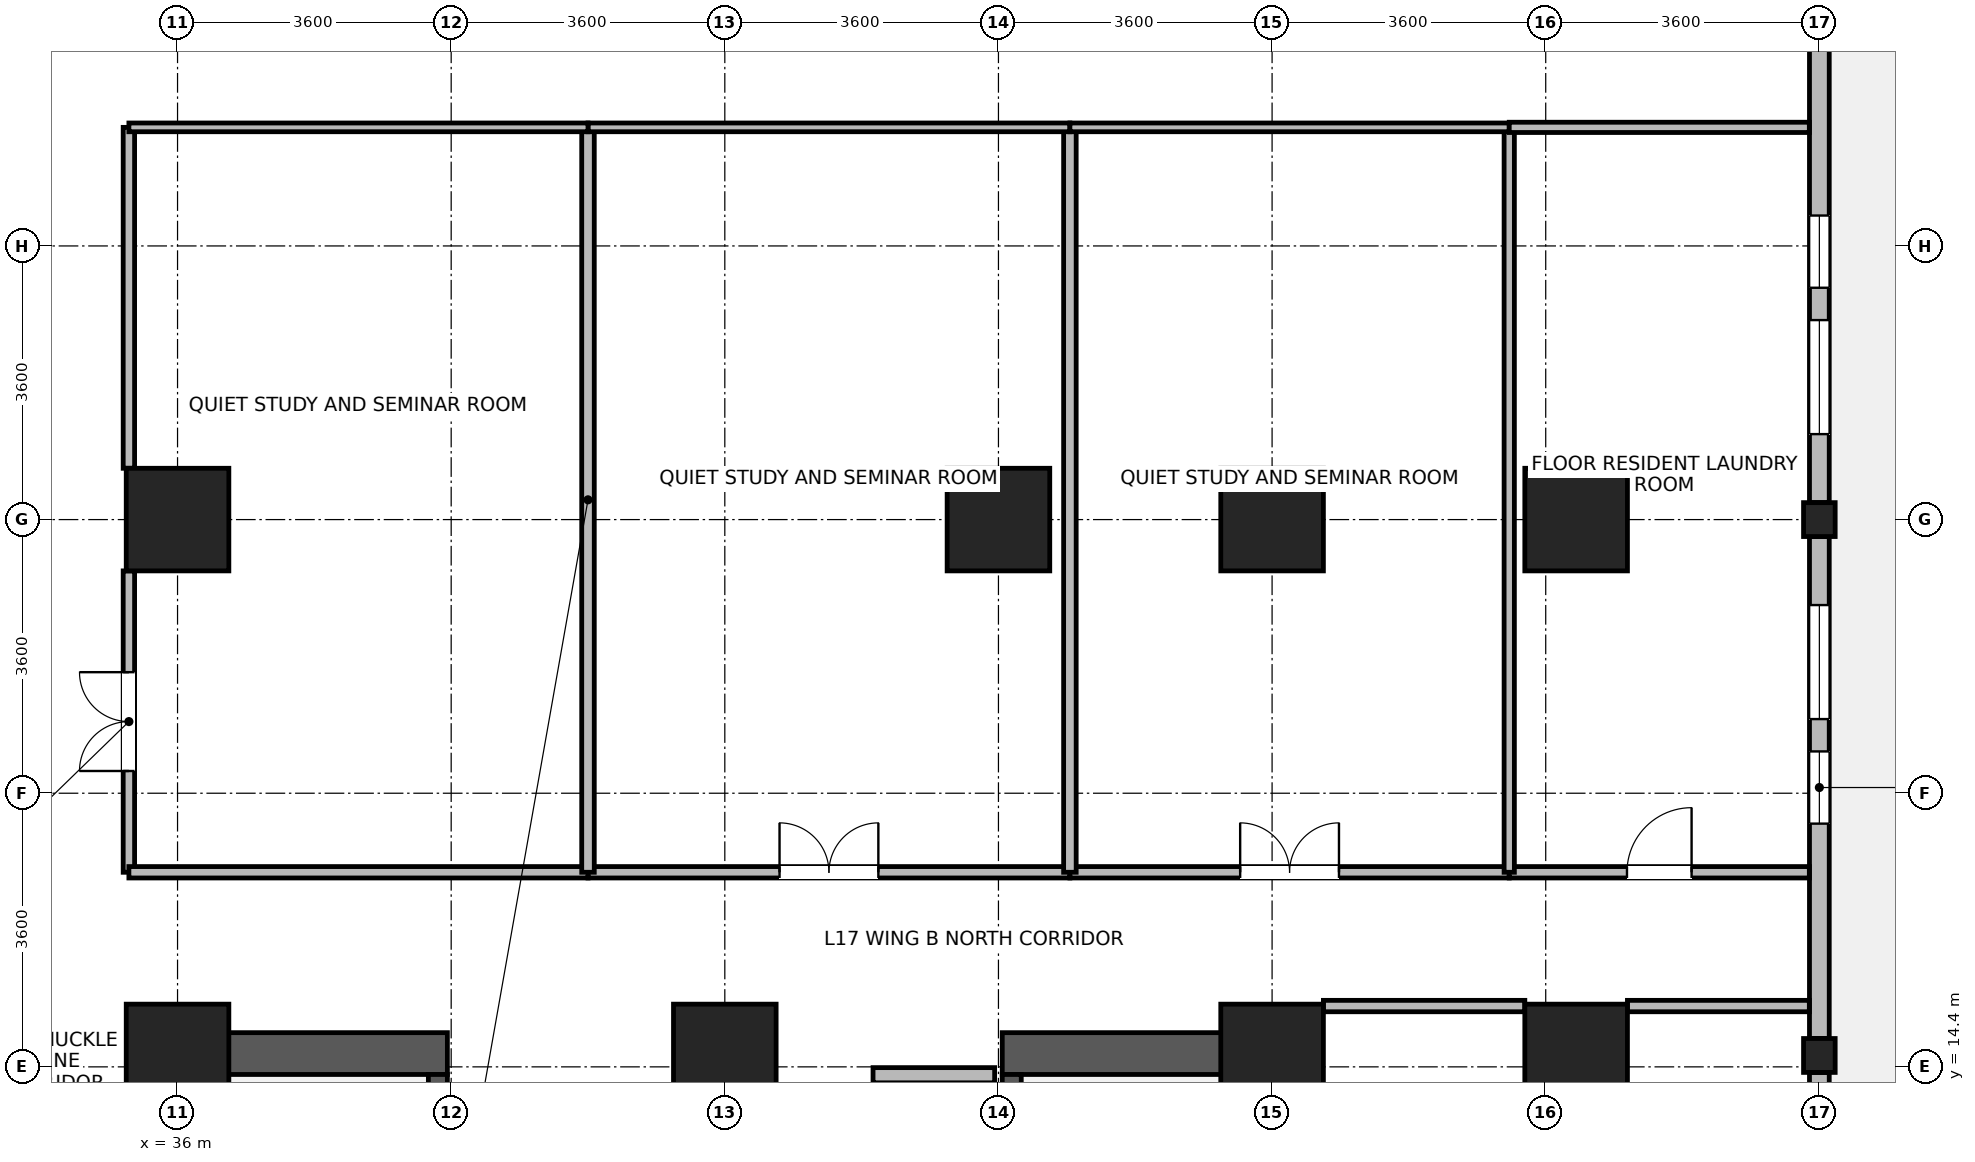
"""IFC4 building model, lengths in metres.
Left out: names, types, materials, properties, quantities, classifications, styles, units other than length and angle.
Written with IfcOpenShell. Run it as: python <this file> out.ifc"""

import sys

from ifc_helpers import new_model, si_unit, direction, frame, frame_2d, origin, origin_2d, place, context, subcontext, project, spatial, rectangle, i_section, extrude, source, transform, mapped, element, fill, save


model = new_model("IFC4")
c1 = context("Model", 3, precision=1e-05, world=origin(), true_north=direction((0.0, 1.0)))
c2 = subcontext(c1, "Body", "Model", "MODEL_VIEW")
j1 = project(units=[si_unit("LENGTHUNIT", "METRE"), si_unit("PLANEANGLEUNIT", "RADIAN")], contexts=[c1])
p1 = place(None, origin())
s1 = spatial("IfcSite", under=j1, at=p1, CompositionType="ELEMENT")
p2 = place(p1, origin())
s2 = spatial("IfcBuilding", under=s1, at=p2, CompositionType="ELEMENT")
p3 = place(p2, frame((0.0, 0.0, 69.7)))
s3 = spatial("IfcBuildingStorey", under=s2, at=p3, CompositionType="ELEMENT", Elevation=69.7)
for number, where, z_axis, x_axis in (
    (1, (36.075, 6.75, 0.0), (0.0, 0.0, 1.0), (0.0, 1.0, 0.0)),
    (2, (50.325, 6.75, 0.0), (0.0, 0.0, 1.0), (0.0, 1.0, 0.0)),
):
    element("IfcWall", number, at=place(p3, frame(where, z_axis=z_axis, x_axis=x_axis)), inside=s3, PredefinedType="SHEAR", context=c2, shape_type="SweptSolid", body=[
        extrude(rectangle(XDim=8.1, YDim=0.55, at=frame_2d((4.05, 0.0))), origin(), (0.0, 0.0, 1.0), 3.34),
    ])
for number, where, z_axis, x_axis in (
    (3, (36.35, 14.575, 0.0), (0.0, 0.0, 1.0), (1.0, 0.0, 0.0)),
    (4, (46.85, 14.575, 0.0), (0.0, 0.0, 1.0), (1.0, 0.0, 0.0)),
):
    element("IfcWall", number, at=place(p3, frame(where, z_axis=z_axis, x_axis=x_axis)), inside=s3, PredefinedType="SHEAR", context=c2, shape_type="SweptSolid", body=[
        extrude(rectangle(XDim=3.2, YDim=0.55, at=frame_2d((1.6, 0.0))), origin(), (0.0, 0.0, 1.0), 3.34),
    ])
p4 = place(p3, frame((39.425, 7.3, 0.0), z_axis=(0.0, 0.0, 1.0), x_axis=(0.0, 1.0, 0.0)))
e5 = element("IfcWall", 5, at=p4, inside=s3, PredefinedType="SHEAR", context=c2, shape_type="SweptSolid", body=[
    extrude(rectangle(XDim=7.0, YDim=0.25, at=frame_2d((3.5, 0.0))), origin(), (0.0, 0.0, 1.0), 3.34),
])
p5 = place(p4, frame((0.15, 0.0, 0.0)))
e6 = element("IfcOpeningElement", 6, at=p5, cuts=e5, PredefinedType="OPENING", context=c2, shape_type="SweptSolid", body=[
    extrude(rectangle(XDim=1.1, YDim=2.08, at=frame_2d((0.55, 1.04))), frame((0.0, 0.135, 0.0), z_axis=(0.0, -1.0, 0.0), x_axis=(1.0, 0.0, 0.0)), (0.0, 0.0, 1.0), 0.27),
])
p6 = place(p3, frame((46.975, 7.3, 0.0), z_axis=(0.0, 0.0, 1.0), x_axis=(0.0, 1.0, 0.0)))
e7 = element("IfcWall", 7, at=p6, inside=s3, PredefinedType="SHEAR", context=c2, shape_type="SweptSolid", body=[
    extrude(rectangle(XDim=7.0, YDim=0.25, at=frame_2d((3.5, 0.0))), origin(), (0.0, 0.0, 1.0), 3.34),
])
p7 = place(p6, frame((0.15, 0.0, 0.0)))
e8 = element("IfcOpeningElement", 8, at=p7, cuts=e7, PredefinedType="OPENING", context=c2, shape_type="SweptSolid", body=[
    extrude(rectangle(XDim=1.1, YDim=2.08, at=frame_2d((0.55, 1.04))), frame((0.0, 0.135, 0.0), z_axis=(0.0, -1.0, 0.0), x_axis=(1.0, 0.0, 0.0)), (0.0, 0.0, 1.0), 0.27),
])
m1 = source(origin(), c2, "Body", "SweptSolid", [
    extrude(rectangle(XDim=1.35, YDim=1.35, at=origin_2d()), origin(), (0.0, 0.0, 1.0), 3.7),
])
for number, where, z_axis, x_axis in (
    (9, (36.0, 21.6, 0.0), (0.0, 0.0, 1.0), (1.0, 0.0, 0.0)),
    (10, (46.8, 21.6, 0.0), (0.0, 0.0, 1.0), (1.0, 0.0, 0.0)),
    (11, (36.0, 14.55, 0.0), (0.0, 0.0, 1.0), (1.0, 0.0, 0.0)),
    (12, (43.2, 14.55, 0.0), (0.0, 0.0, 1.0), (1.0, 0.0, 0.0)),
    (13, (50.4, 14.55, 0.0), (0.0, 0.0, 1.0), (1.0, 0.0, 0.0)),
    (14, (50.4, 21.6, 0.0), (0.0, 0.0, 1.0), (1.0, 0.0, 0.0)),
    (15, (54.4, 14.55, 0.0), (0.0, 0.0, 1.0), (1.0, 0.0, 0.0)),
    (16, (54.4, 21.6, 0.0), (0.0, 0.0, 1.0), (1.0, 0.0, 0.0)),
):
    element("IfcColumn", number, at=place(p3, frame(where, z_axis=z_axis, x_axis=x_axis)), inside=s3, PredefinedType="COLUMN", context=c2, shape_type="MappedRepresentation", body=[
        mapped(m1, transform((0.0, 0.0, 0.0), x_axis=(1.0, 0.0, 0.0), y_axis=(0.0, 1.0, 0.0), z_axis=(0.0, 0.0, 1.0), scale=1.0)),
    ])
m2 = source(origin(), c2, "Body", "SweptSolid", [
    extrude(i_section(OverallWidth=0.416, OverallDepth=0.446, WebThickness=0.029, FlangeThickness=0.04, FilletRadius=0.015, at=origin_2d()), origin(), (0.0, 0.0, 1.0), 3.7),
])
for number, where, z_axis, x_axis in (
    (17, (57.6, 14.55, 0.0), (0.0, 0.0, 1.0), (1.0, 0.0, 0.0)),
    (18, (57.6, 21.6, 0.0), (0.0, 0.0, 1.0), (1.0, 0.0, 0.0)),
):
    element("IfcColumn", number, at=place(p3, frame(where, z_axis=z_axis, x_axis=x_axis)), inside=s3, PredefinedType="COLUMN", context=c2, shape_type="MappedRepresentation", body=[
        mapped(m2, transform((0.0, 0.0, 0.0), x_axis=(1.0, 0.0, 0.0), y_axis=(0.0, 1.0, 0.0), z_axis=(0.0, 0.0, 1.0), scale=1.0)),
    ])
p8 = place(p3, frame((57.6, 14.326, 0.0), z_axis=(0.0, 0.0, 1.0), x_axis=(0.0, -1.0, 0.0)))
e19 = element("IfcWall", 19, at=p8, inside=s3, PredefinedType="STANDARD", context=c2, shape_type="SweptSolid", body=[
    extrude(rectangle(XDim=7.052, YDim=0.26, at=frame_2d((3.526, 0.0))), origin(), (0.0, 0.0, 1.0), 2.82),
])
p9 = place(p8, frame((2.776, 0.0, 0.0)))
e20 = element("IfcOpeningElement", 20, at=p9, cuts=e19, PredefinedType="OPENING", context=c2, shape_type="SweptSolid", body=[
    extrude(rectangle(XDim=1.5, YDim=2.15, at=frame_2d((0.75, 1.075))), frame((0.0, 0.14, 0.0), z_axis=(0.0, -1.0, 0.0), x_axis=(1.0, 0.0, 0.0)), (0.0, 0.0, 1.0), 0.28),
])
p10 = place(p8, frame((1.013, 0.0, 0.85)))
e21 = element("IfcOpeningElement", 21, at=p10, cuts=e19, PredefinedType="OPENING", context=c2, shape_type="SweptSolid", body=[
    extrude(rectangle(XDim=1.5, YDim=1.85, at=frame_2d((0.75, 0.925))), frame((0.0, 0.14, 0.0), z_axis=(0.0, -1.0, 0.0), x_axis=(1.0, 0.0, 0.0)), (0.0, 0.0, 1.0), 0.28),
])
p11 = place(p8, frame((4.539, 0.0, 0.85)))
e22 = element("IfcOpeningElement", 22, at=p11, cuts=e19, PredefinedType="OPENING", context=c2, shape_type="SweptSolid", body=[
    extrude(rectangle(XDim=1.5, YDim=1.85, at=frame_2d((0.75, 0.925))), frame((0.0, 0.14, 0.0), z_axis=(0.0, -1.0, 0.0), x_axis=(1.0, 0.0, 0.0)), (0.0, 0.0, 1.0), 0.28),
])
p12 = place(p3, frame((57.6, 21.376, 0.0), z_axis=(0.0, 0.0, 1.0), x_axis=(0.0, -1.0, 0.0)))
e23 = element("IfcWall", 23, at=p12, inside=s3, PredefinedType="STANDARD", context=c2, shape_type="SweptSolid", body=[
    extrude(rectangle(XDim=6.602, YDim=0.26, at=frame_2d((3.301, 0.0))), origin(), (0.0, 0.0, 1.0), 2.82),
])
p13 = place(p12, frame((0.9, 0.0, 0.85)))
e24 = element("IfcOpeningElement", 24, at=p13, cuts=e23, PredefinedType="OPENING", context=c2, shape_type="SweptSolid", body=[
    extrude(rectangle(XDim=1.5, YDim=1.85, at=frame_2d((0.75, 0.925))), frame((0.0, 0.14, 0.0), z_axis=(0.0, -1.0, 0.0), x_axis=(1.0, 0.0, 0.0)), (0.0, 0.0, 1.0), 0.28),
])
p14 = place(p12, frame((2.826, 0.0, 0.85)))
e25 = element("IfcOpeningElement", 25, at=p14, cuts=e23, PredefinedType="OPENING", context=c2, shape_type="SweptSolid", body=[
    extrude(rectangle(XDim=0.95, YDim=1.75, at=frame_2d((0.475, 0.875))), frame((0.0, 0.14, 0.0), z_axis=(0.0, -1.0, 0.0), x_axis=(1.0, 0.0, 0.0)), (0.0, 0.0, 1.0), 0.28),
])
p15 = place(p3, frame((57.6, 28.426, 0.0), z_axis=(0.0, 0.0, 1.0), x_axis=(0.0, -1.0, 0.0)))
e26 = element("IfcWall", 26, at=p15, inside=s3, PredefinedType="STANDARD", context=c2, shape_type="SweptSolid", body=[
    extrude(rectangle(XDim=6.602, YDim=0.26, at=frame_2d((3.301, 0.0))), origin(), (0.0, 0.0, 1.0), 2.82),
])
p16 = place(p15, frame((4.201, 0.0, 0.85)))
e27 = element("IfcOpeningElement", 27, at=p16, cuts=e26, PredefinedType="OPENING", context=c2, shape_type="SweptSolid", body=[
    extrude(rectangle(XDim=1.5, YDim=1.85, at=frame_2d((0.75, 0.925))), frame((0.0, 0.14, 0.0), z_axis=(0.0, -1.0, 0.0), x_axis=(1.0, 0.0, 0.0)), (0.0, 0.0, 1.0), 0.28),
])
p17 = place(p15, frame((2.826, 0.0, 0.85)))
e28 = element("IfcOpeningElement", 28, at=p17, cuts=e26, PredefinedType="OPENING", context=c2, shape_type="SweptSolid", body=[
    extrude(rectangle(XDim=0.95, YDim=1.75, at=frame_2d((0.475, 0.875))), frame((0.0, 0.14, 0.0), z_axis=(0.0, -1.0, 0.0), x_axis=(1.0, 0.0, 0.0)), (0.0, 0.0, 1.0), 0.28),
])
p18 = place(p3, frame((45.15, 14.29, 0.0), z_axis=(0.0, 0.0, 1.0), x_axis=(1.0, 0.0, 0.0)))
e29 = element("IfcWall", 29, at=p18, inside=s3, PredefinedType="PARTITIONING", context=c2, shape_type="SweptSolid", body=[
    extrude(rectangle(XDim=1.6, YDim=0.2, at=frame_2d((0.8, 0.0))), origin(), (0.0, 0.0, 1.0), 2.12),
])
p19 = place(p3, frame((35.36, 16.96, 0.0), z_axis=(0.0, 0.0, 1.0), x_axis=(0.0, 1.0, 0.0)))
e30 = element("IfcWall", 30, at=p19, inside=s3, PredefinedType="PARTITIONING", context=c2, shape_type="SweptSolid", body=[
    extrude(rectangle(XDim=3.965, YDim=0.15, at=frame_2d((1.982, 0.0))), origin(), (0.0, 0.0, 1.0), 3.32),
])
p20 = place(p19, frame((1.333, 0.0, 0.0)))
e31 = element("IfcOpeningElement", 31, at=p20, cuts=e30, PredefinedType="OPENING", context=c2, shape_type="SweptSolid", body=[
    extrude(rectangle(XDim=1.3, YDim=2.12, at=frame_2d((0.65, 1.06))), frame((0.0, 0.085, 0.0), z_axis=(0.0, -1.0, 0.0), x_axis=(1.0, 0.0, 0.0)), (0.0, 0.0, 1.0), 0.17),
])
p21 = place(p3, frame((35.36, 22.275, 0.0), z_axis=(0.0, 0.0, 1.0), x_axis=(0.0, 1.0, 0.0)))
e32 = element("IfcWall", 32, at=p21, inside=s3, PredefinedType="PARTITIONING", context=c2, shape_type="SweptSolid", body=[
    extrude(rectangle(XDim=4.485, YDim=0.15, at=frame_2d((2.243, 0.0))), origin(), (0.0, 0.0, 1.0), 3.32),
])
p22 = place(p3, frame((51.075, 15.2, 0.0), z_axis=(0.0, 0.0, 1.0), x_axis=(1.0, 0.0, 0.0)))
e33 = element("IfcWall", 33, at=p22, inside=s3, PredefinedType="PARTITIONING", context=c2, shape_type="SweptSolid", body=[
    extrude(rectangle(XDim=2.65, YDim=0.15, at=frame_2d((1.325, 0.0))), origin(), (0.0, 0.0, 1.0), 3.32),
])
p23 = place(p3, frame((55.075, 15.2, 0.0), z_axis=(0.0, 0.0, 1.0), x_axis=(1.0, 0.0, 0.0)))
e34 = element("IfcWall", 34, at=p23, inside=s3, PredefinedType="PARTITIONING", context=c2, shape_type="SweptSolid", body=[
    extrude(rectangle(XDim=2.393, YDim=0.15, at=frame_2d((1.197, 0.0))), origin(), (0.0, 0.0, 1.0), 3.32),
])
p24 = place(p3, frame((41.4, 16.96, 0.0), z_axis=(0.0, 0.0, 1.0), x_axis=(1.0, 0.0, 0.0)))
e35 = element("IfcWall", 35, at=p24, inside=s3, PredefinedType="PARTITIONING", context=c2, shape_type="SweptSolid", body=[
    extrude(rectangle(XDim=6.34, YDim=0.15, at=frame_2d((3.17, 0.0))), origin(), (0.0, 0.0, 1.0), 3.32),
])
p25 = place(p24, frame((2.52, 0.0, 0.0)))
e36 = element("IfcOpeningElement", 36, at=p25, cuts=e35, PredefinedType="OPENING", context=c2, shape_type="SweptSolid", body=[
    extrude(rectangle(XDim=1.3, YDim=2.12, at=frame_2d((0.65, 1.06))), frame((0.0, 0.085, 0.0), z_axis=(0.0, -1.0, 0.0), x_axis=(1.0, 0.0, 0.0)), (0.0, 0.0, 1.0), 0.17),
])
p26 = place(p3, frame((35.36, 16.96, 0.0), z_axis=(0.0, 0.0, 1.0), x_axis=(1.0, 0.0, 0.0)))
e37 = element("IfcWall", 37, at=p26, inside=s3, PredefinedType="PARTITIONING", context=c2, shape_type="SweptSolid", body=[
    extrude(rectangle(XDim=6.04, YDim=0.15, at=frame_2d((3.02, 0.0))), origin(), (0.0, 0.0, 1.0), 3.32),
])
p27 = place(p3, frame((47.74, 16.96, 0.0), z_axis=(0.0, 0.0, 1.0), x_axis=(1.0, 0.0, 0.0)))
e38 = element("IfcWall", 38, at=p27, inside=s3, PredefinedType="PARTITIONING", context=c2, shape_type="SweptSolid", body=[
    extrude(rectangle(XDim=5.78, YDim=0.15, at=frame_2d((2.89, 0.0))), origin(), (0.0, 0.0, 1.0), 3.32),
])
p28 = place(p27, frame((2.24, 0.0, 0.0)))
e39 = element("IfcOpeningElement", 39, at=p28, cuts=e38, PredefinedType="OPENING", context=c2, shape_type="SweptSolid", body=[
    extrude(rectangle(XDim=1.3, YDim=2.12, at=frame_2d((0.65, 1.06))), frame((0.0, 0.085, 0.0), z_axis=(0.0, -1.0, 0.0), x_axis=(1.0, 0.0, 0.0)), (0.0, 0.0, 1.0), 0.17),
])
p29 = place(p3, frame((53.52, 16.96, 0.0), z_axis=(0.0, 0.0, 1.0), x_axis=(1.0, 0.0, 0.0)))
e40 = element("IfcWall", 40, at=p29, inside=s3, PredefinedType="PARTITIONING", context=c2, shape_type="SweptSolid", body=[
    extrude(rectangle(XDim=3.948, YDim=0.15, at=frame_2d((1.974, 0.0))), origin(), (0.0, 0.0, 1.0), 3.32),
])
p30 = place(p29, frame((1.549, 0.0, 0.0)))
e41 = element("IfcOpeningElement", 41, at=p30, cuts=e40, PredefinedType="OPENING", context=c2, shape_type="SweptSolid", body=[
    extrude(rectangle(XDim=0.85, YDim=2.04, at=frame_2d((0.425, 1.02))), frame((0.0, 0.085, 0.0), z_axis=(0.0, -1.0, 0.0), x_axis=(1.0, 0.0, 0.0)), (0.0, 0.0, 1.0), 0.17),
])
for number, where, z_axis, x_axis in (
    (42, (41.4, 16.96, 0.0), (0.0, 0.0, 1.0), (0.0, 1.0, 0.0)),
    (43, (47.74, 16.96, 0.0), (0.0, 0.0, 1.0), (0.0, 1.0, 0.0)),
):
    element("IfcWall", number, at=place(p3, frame(where, z_axis=z_axis, x_axis=x_axis)), inside=s3, PredefinedType="PARTITIONING", context=c2, shape_type="SweptSolid", body=[
        extrude(rectangle(XDim=9.8, YDim=0.165, at=frame_2d((4.9, 0.0))), origin(), (0.0, 0.0, 1.0), 3.32),
    ])
p31 = place(p3, frame((53.52, 16.96, 0.0), z_axis=(0.0, 0.0, 1.0), x_axis=(0.0, 1.0, 0.0)))
e44 = element("IfcWall", 44, at=p31, inside=s3, PredefinedType="PARTITIONING", context=c2, shape_type="SweptSolid", body=[
    extrude(rectangle(XDim=9.8, YDim=0.135, at=frame_2d((4.9, 0.0))), origin(), (0.0, 0.0, 1.0), 3.32),
])
p32 = place(p3, frame((41.4, 26.76, 0.0), z_axis=(0.0, 0.0, 1.0), x_axis=(1.0, 0.0, 0.0)))
e45 = element("IfcWall", 45, at=p32, inside=s3, PredefinedType="PARTITIONING", context=c2, shape_type="SweptSolid", body=[
    extrude(rectangle(XDim=6.34, YDim=0.115, at=frame_2d((3.17, 0.0))), origin(), (0.0, 0.0, 1.0), 3.32),
])
p33 = place(p3, frame((35.36, 26.76, 0.0), z_axis=(0.0, 0.0, 1.0), x_axis=(1.0, 0.0, 0.0)))
e46 = element("IfcWall", 46, at=p33, inside=s3, PredefinedType="PARTITIONING", context=c2, shape_type="SweptSolid", body=[
    extrude(rectangle(XDim=6.04, YDim=0.115, at=frame_2d((3.02, 0.0))), origin(), (0.0, 0.0, 1.0), 3.32),
])
p34 = place(p3, frame((47.74, 26.76, 0.0), z_axis=(0.0, 0.0, 1.0), x_axis=(1.0, 0.0, 0.0)))
e47 = element("IfcWall", 47, at=p34, inside=s3, PredefinedType="PARTITIONING", context=c2, shape_type="SweptSolid", body=[
    extrude(rectangle(XDim=5.78, YDim=0.115, at=frame_2d((2.89, 0.0))), origin(), (0.0, 0.0, 1.0), 3.32),
])
p35 = place(p3, frame((53.52, 26.76, 0.0), z_axis=(0.0, 0.0, 1.0), x_axis=(1.0, 0.0, 0.0)))
e48 = element("IfcWall", 48, at=p35, inside=s3, PredefinedType="PARTITIONING", context=c2, shape_type="SweptSolid", body=[
    extrude(rectangle(XDim=3.948, YDim=0.135, at=frame_2d((1.974, 0.0))), origin(), (0.0, 0.0, 1.0), 3.32),
])
p36 = place(p13, origin())
e49 = element("IfcWindow", 49, at=p36, inside=s3, PartitioningType="SINGLE_PANEL", PredefinedType="WINDOW", context=c2, shape_type="SweptSolid", body=[
    extrude(rectangle(XDim=1.5, YDim=1.85, at=frame_2d((0.75, 0.925))), frame((0.0, 0.03, 0.0), z_axis=(0.0, -1.0, 0.0), x_axis=(1.0, 0.0, 0.0)), (0.0, 0.0, 1.0), 0.06),
])
fill(e24, e49)
p37 = place(p14, origin())
e50 = element("IfcWindow", 50, at=p37, inside=s3, PartitioningType="SINGLE_PANEL", PredefinedType="WINDOW", context=c2, shape_type="SweptSolid", body=[
    extrude(rectangle(XDim=0.95, YDim=1.75, at=frame_2d((0.475, 0.875))), frame((0.0, 0.03, 0.0), z_axis=(0.0, -1.0, 0.0), x_axis=(1.0, 0.0, 0.0)), (0.0, 0.0, 1.0), 0.06),
])
fill(e25, e50)
p38 = place(p16, origin())
e51 = element("IfcWindow", 51, at=p38, inside=s3, PartitioningType="SINGLE_PANEL", PredefinedType="WINDOW", context=c2, shape_type="SweptSolid", body=[
    extrude(rectangle(XDim=1.5, YDim=1.85, at=frame_2d((0.75, 0.925))), frame((0.0, 0.03, 0.0), z_axis=(0.0, -1.0, 0.0), x_axis=(1.0, 0.0, 0.0)), (0.0, 0.0, 1.0), 0.06),
])
fill(e27, e51)
p39 = place(p17, origin())
e52 = element("IfcWindow", 52, at=p39, inside=s3, PartitioningType="SINGLE_PANEL", PredefinedType="WINDOW", context=c2, shape_type="SweptSolid", body=[
    extrude(rectangle(XDim=0.95, YDim=1.75, at=frame_2d((0.475, 0.875))), frame((0.0, 0.03, 0.0), z_axis=(0.0, -1.0, 0.0), x_axis=(1.0, 0.0, 0.0)), (0.0, 0.0, 1.0), 0.06),
])
fill(e28, e52)
p40 = place(p20, origin())
e53 = element("IfcDoor", 53, at=p40, inside=s3, OperationType="DOUBLE_DOOR_SINGLE_SWING", PredefinedType="DOOR", context=c2, shape_type="SweptSolid", body=[
    extrude(rectangle(XDim=1.3, YDim=2.12, at=frame_2d((0.65, 1.06))), frame((0.0, 0.025, 0.0), z_axis=(0.0, -1.0, 0.0), x_axis=(1.0, 0.0, 0.0)), (0.0, 0.0, 1.0), 0.05),
])
fill(e31, e53)
p41 = place(p25, origin())
e54 = element("IfcDoor", 54, at=p41, inside=s3, OperationType="DOUBLE_DOOR_SINGLE_SWING", PredefinedType="DOOR", context=c2, shape_type="SweptSolid", body=[
    extrude(rectangle(XDim=1.3, YDim=2.12, at=frame_2d((0.65, 1.06))), frame((0.0, 0.025, 0.0), z_axis=(0.0, -1.0, 0.0), x_axis=(1.0, 0.0, 0.0)), (0.0, 0.0, 1.0), 0.05),
])
fill(e36, e54)
p42 = place(p28, origin())
e55 = element("IfcDoor", 55, at=p42, inside=s3, OperationType="DOUBLE_DOOR_SINGLE_SWING", PredefinedType="DOOR", context=c2, shape_type="SweptSolid", body=[
    extrude(rectangle(XDim=1.3, YDim=2.12, at=frame_2d((0.65, 1.06))), frame((0.0, 0.025, 0.0), z_axis=(0.0, -1.0, 0.0), x_axis=(1.0, 0.0, 0.0)), (0.0, 0.0, 1.0), 0.05),
])
fill(e39, e55)
p43 = place(p30, origin())
e56 = element("IfcDoor", 56, at=p43, inside=s3, OperationType="SINGLE_SWING_RIGHT", PredefinedType="DOOR", context=c2, shape_type="SweptSolid", body=[
    extrude(rectangle(XDim=0.85, YDim=2.04, at=frame_2d((0.425, 1.02))), frame((0.0, 0.025, 0.0), z_axis=(0.0, -1.0, 0.0), x_axis=(1.0, 0.0, 0.0)), (0.0, 0.0, 1.0), 0.05),
])
fill(e41, e56)
save(model, sys.argv[1])
